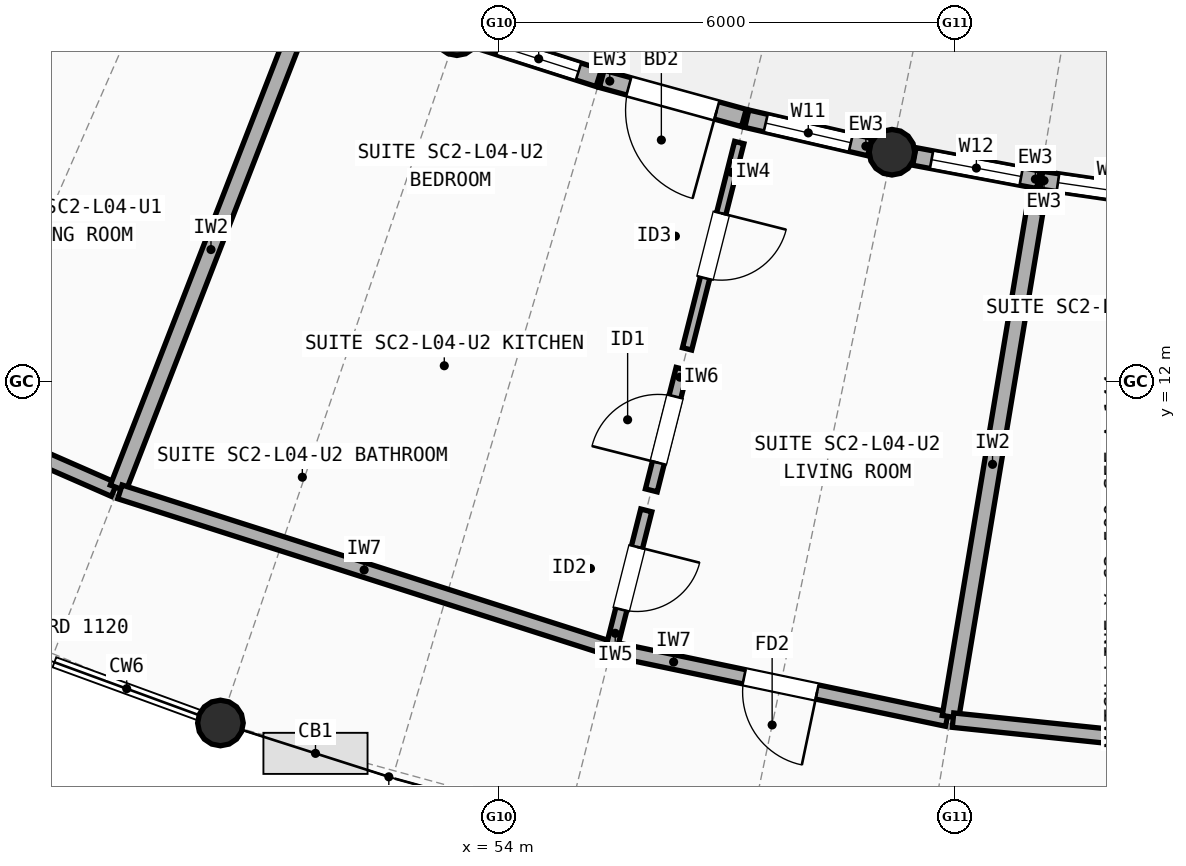
"""IFC4 building model, lengths in metres.
Left out: names, types, materials, properties, quantities, classifications, styles, units other than length and angle.
Written with IfcOpenShell. Run it as: python <this file> out.ifc"""

import sys

from ifc_helpers import new_model, si_unit, direction, frame, frame_2d, origin, origin_2d, place, context, subcontext, project, spatial, rectangle, circle, extrude, element, fill, save


model = new_model("IFC4")
c1 = context("Model", 3, precision=1e-05, world=origin(), true_north=direction((0.0, 1.0)))
c2 = subcontext(c1, "Body", "Model", "MODEL_VIEW")
j1 = project(units=[si_unit("LENGTHUNIT", "METRE"), si_unit("PLANEANGLEUNIT", "RADIAN")], contexts=[c1])
p1 = place(None, origin())
s1 = spatial("IfcSite", under=j1, at=p1, CompositionType="ELEMENT")
p2 = place(p1, origin())
s2 = spatial("IfcBuilding", under=s1, at=p2, CompositionType="ELEMENT")
p3 = place(p2, frame((0.0, 0.0, 14.1)))
s3 = spatial("IfcBuildingStorey", under=s2, at=p3, CompositionType="ELEMENT", Elevation=14.1)
for number, where, z_axis, x_axis in (
    (1, (53.445, 16.59, 0.0), (0.0, 0.0, 1.0), (1.0, 0.0, 0.0)),
    (2, (50.334, 7.508, 0.0), (0.0, 0.0, 1.0), (1.0, 0.0, 0.0)),
    (3, (59.169, 15.018, 0.0), (0.0, 0.0, 1.0), (1.0, 0.0, 0.0)),
):
    element("IfcColumn", number, at=place(p3, frame(where, z_axis=z_axis, x_axis=x_axis)), inside=s3, PredefinedType="COLUMN", context=c2, shape_type="SweptSolid", body=[
        extrude(circle(Radius=0.3, at=origin_2d()), origin(), (0.0, 0.0, 1.0), 2.948),
    ])
p4 = place(p3, frame((53.731, 16.499, 0.0), z_axis=(0.0, 0.0, 1.0), x_axis=(0.952523149859, -0.304466170508, 0.0)))
e4 = element("IfcWall", 4, at=p4, inside=s3, PredefinedType="STANDARD", context=c2, shape_type="SweptSolid", body=[
    extrude(rectangle(XDim=1.66, YDim=0.235, at=frame_2d((0.83, 0.0))), origin(), (0.0, 0.0, 1.0), 2.684),
])
p5 = place(p4, frame((0.28, 0.0, 0.85)))
e5 = element("IfcOpeningElement", 5, at=p5, cuts=e4, PredefinedType="OPENING", context=c2, shape_type="SweptSolid", body=[
    extrude(rectangle(XDim=1.1, YDim=1.45, at=frame_2d((0.55, 0.725))), frame((0.0, 0.127, 0.0), z_axis=(0.0, -1.0, 0.0), x_axis=(1.0, 0.0, 0.0)), (0.0, 0.0, 1.0), 0.255),
])
p6 = place(p3, frame((55.35, 15.982, 0.0), z_axis=(0.0, 0.0, 1.0), x_axis=(0.964271323293, -0.264916619098, 0.0)))
e6 = element("IfcWall", 6, at=p6, inside=s3, PredefinedType="STANDARD", context=c2, shape_type="SweptSolid", body=[
    extrude(rectangle(XDim=1.94, YDim=0.235, at=frame_2d((0.97, 0.0))), origin(), (0.0, 0.0, 1.0), 2.684),
])
p7 = place(p6, frame((0.37, 0.0, 0.0)))
e7 = element("IfcOpeningElement", 7, at=p7, cuts=e6, PredefinedType="OPENING", context=c2, shape_type="SweptSolid", body=[
    extrude(rectangle(XDim=1.2, YDim=2.15, at=frame_2d((0.6, 1.075))), frame((0.0, 0.127, 0.0), z_axis=(0.0, -1.0, 0.0), x_axis=(1.0, 0.0, 0.0)), (0.0, 0.0, 1.0), 0.255),
])
p8 = place(p3, frame((57.26, 15.458, 0.0), z_axis=(0.0, 0.0, 1.0), x_axis=(0.974354001174, -0.225020622158, 0.0)))
e8 = element("IfcWall", 8, at=p8, inside=s3, PredefinedType="STANDARD", context=c2, shape_type="SweptSolid", body=[
    extrude(rectangle(XDim=1.66, YDim=0.235, at=frame_2d((0.83, 0.0))), origin(), (0.0, 0.0, 1.0), 2.684),
])
p9 = place(p8, frame((0.255, 0.0, 0.85)))
e9 = element("IfcOpeningElement", 9, at=p9, cuts=e8, PredefinedType="OPENING", context=c2, shape_type="SweptSolid", body=[
    extrude(rectangle(XDim=1.15, YDim=1.45, at=frame_2d((0.575, 0.725))), frame((0.0, 0.127, 0.0), z_axis=(0.0, -1.0, 0.0), x_axis=(1.0, 0.0, 0.0)), (0.0, 0.0, 1.0), 0.255),
])
p10 = place(p3, frame((59.464, 14.962, 0.0), z_axis=(0.0, 0.0, 1.0), x_axis=(0.982820537681, -0.184563784945, 0.0)))
e10 = element("IfcWall", 10, at=p10, inside=s3, PredefinedType="STANDARD", context=c2, shape_type="SweptSolid", body=[
    extrude(rectangle(XDim=1.66, YDim=0.235, at=frame_2d((0.83, 0.0))), origin(), (0.0, 0.0, 1.0), 2.684),
])
p11 = place(p10, frame((0.23, 0.0, 0.85)))
e11 = element("IfcOpeningElement", 11, at=p11, cuts=e10, PredefinedType="OPENING", context=c2, shape_type="SweptSolid", body=[
    extrude(rectangle(XDim=1.2, YDim=1.35, at=frame_2d((0.6, 0.675))), frame((0.0, 0.127, 0.0), z_axis=(0.0, -1.0, 0.0), x_axis=(1.0, 0.0, 0.0)), (0.0, 0.0, 1.0), 0.255),
])
p12 = place(p3, frame((61.135, 14.649, 0.0), z_axis=(0.0, 0.0, 1.0), x_axis=(0.989601751146, -0.14383453733, 0.0)))
e12 = element("IfcWall", 12, at=p12, inside=s3, PredefinedType="STANDARD", context=c2, shape_type="SweptSolid", body=[
    extrude(rectangle(XDim=1.94, YDim=0.235, at=frame_2d((0.97, 0.0))), origin(), (0.0, 0.0, 1.0), 2.684),
])
p13 = place(p12, frame((0.22, 0.0, 0.85)))
e13 = element("IfcOpeningElement", 13, at=p13, cuts=e12, PredefinedType="OPENING", context=c2, shape_type="SweptSolid", body=[
    extrude(rectangle(XDim=1.5, YDim=1.4, at=frame_2d((0.75, 0.7))), frame((0.0, 0.127, 0.0), z_axis=(0.0, -1.0, 0.0), x_axis=(1.0, 0.0, 0.0)), (0.0, 0.0, 1.0), 0.255),
])
p14 = place(p3, frame((44.838, 12.371, 0.0), z_axis=(0.0, 0.0, 1.0), x_axis=(0.91610596958, -0.40093621999, 0.0)))
e14 = element("IfcWall", 14, at=p14, inside=s3, PredefinedType="SOLIDWALL", context=c2, shape_type="SweptSolid", body=[
    extrude(rectangle(XDim=4.473, YDim=0.19, at=frame_2d((2.237, 0.0))), origin(), (0.0, 0.0, 1.0), 2.742),
])
p15 = place(p14, frame((1.737, 0.0, 0.0)))
e15 = element("IfcOpeningElement", 15, at=p15, cuts=e14, PredefinedType="OPENING", context=c2, shape_type="SweptSolid", body=[
    extrude(rectangle(XDim=1.0, YDim=2.15, at=frame_2d((0.5, 1.075))), frame((0.0, 0.105, 0.0), z_axis=(0.0, -1.0, 0.0), x_axis=(1.0, 0.0, 0.0)), (0.0, 0.0, 1.0), 0.21),
])
p16 = place(p3, frame((51.431, 16.875, 0.0), z_axis=(0.0, 0.0, 1.0), x_axis=(-0.362801288891, -0.931866527341, 0.0)))
e16 = element("IfcWall", 16, at=p16, inside=s3, PredefinedType="SOLIDWALL", context=c2, shape_type="SweptSolid", body=[
    extrude(rectangle(XDim=6.736, YDim=0.22, at=frame_2d((3.368, 0.0))), origin(), (0.0, 0.0, 1.0), 2.762),
])
p17 = place(p3, frame((49.011, 10.549, 0.0), z_axis=(0.0, 0.0, 1.0), x_axis=(0.952529122406, -0.304447484746, 0.0)))
e17 = element("IfcWall", 17, at=p17, inside=s3, PredefinedType="SOLIDWALL", context=c2, shape_type="SweptSolid", body=[
    extrude(rectangle(XDim=6.747, YDim=0.19, at=frame_2d((3.374, 0.0))), origin(), (0.0, 0.0, 1.0), 2.722),
])
p18 = place(p3, frame((55.515, 8.474, 0.0), z_axis=(0.0, 0.0, 1.0), x_axis=(0.978806148413, -0.204788973894, 0.0)))
e18 = element("IfcWall", 18, at=p18, inside=s3, PredefinedType="SOLIDWALL", context=c2, shape_type="SweptSolid", body=[
    extrude(rectangle(XDim=4.473, YDim=0.19, at=frame_2d((2.236, 0.0))), origin(), (0.0, 0.0, 1.0), 2.722),
])
p19 = place(p18, frame((1.747, 0.0, 0.0)))
e19 = element("IfcOpeningElement", 19, at=p19, cuts=e18, PredefinedType="OPENING", context=c2, shape_type="SweptSolid", body=[
    extrude(rectangle(XDim=0.98, YDim=2.15, at=frame_2d((0.49, 1.075))), frame((0.0, 0.105, 0.0), z_axis=(0.0, -1.0, 0.0), x_axis=(1.0, 0.0, 0.0)), (0.0, 0.0, 1.0), 0.21),
])
p20 = place(p3, frame((57.16, 15.145, 0.0), z_axis=(0.0, 0.0, 1.0), x_axis=(-0.245017317517, -0.969518702304, 0.0)))
e20 = element("IfcWall", 20, at=p20, inside=s3, PredefinedType="PARTITIONING", context=c2, shape_type="SweptSolid", body=[
    extrude(rectangle(XDim=2.8, YDim=0.125, at=frame_2d((1.4, 0.0))), origin(), (0.0, 0.0, 1.0), 2.762),
])
p21 = place(p20, frame((0.96, 0.0, 0.0)))
e21 = element("IfcOpeningElement", 21, at=p21, cuts=e20, PredefinedType="OPENING", context=c2, shape_type="SweptSolid", body=[
    extrude(rectangle(XDim=0.88, YDim=2.1, at=frame_2d((0.44, 1.05))), frame((0.0, 0.073, 0.0), z_axis=(0.0, -1.0, 0.0), x_axis=(1.0, 0.0, 0.0)), (0.0, 0.0, 1.0), 0.145),
])
p22 = place(p3, frame((56.407, 12.167, 0.0), z_axis=(0.0, 0.0, 1.0), x_axis=(-0.245044695728, -0.969511782855, 0.0)))
e22 = element("IfcWall", 22, at=p22, inside=s3, PredefinedType="PLUMBINGWALL", context=c2, shape_type="SweptSolid", body=[
    extrude(rectangle(XDim=1.648, YDim=0.16, at=frame_2d((0.824, 0.0))), origin(), (0.0, 0.0, 1.0), 2.762),
])
p23 = place(p22, frame((0.374, 0.0, 0.0)))
e23 = element("IfcOpeningElement", 23, at=p23, cuts=e22, PredefinedType="OPENING", context=c2, shape_type="SweptSolid", body=[
    extrude(rectangle(XDim=0.9, YDim=2.1, at=frame_2d((0.45, 1.05))), frame((0.0, 0.09, 0.0), z_axis=(0.0, -1.0, 0.0), x_axis=(1.0, 0.0, 0.0)), (0.0, 0.0, 1.0), 0.18),
])
p24 = place(p3, frame((55.937, 10.305, 0.0), z_axis=(0.0, 0.0, 1.0), x_axis=(-0.24497035727, -0.969530568914, 0.0)))
e24 = element("IfcWall", 24, at=p24, inside=s3, PredefinedType="PARTITIONING", context=c2, shape_type="SweptSolid", body=[
    extrude(rectangle(XDim=1.84, YDim=0.15, at=frame_2d((0.92, 0.0))), origin(), (0.0, 0.0, 1.0), 2.762),
])
p25 = place(p24, frame((0.495, 0.0, 0.0)))
e25 = element("IfcOpeningElement", 25, at=p25, cuts=e24, PredefinedType="OPENING", context=c2, shape_type="SweptSolid", body=[
    extrude(rectangle(XDim=0.85, YDim=2.1, at=frame_2d((0.425, 1.05))), frame((0.0, 0.085, 0.0), z_axis=(0.0, -1.0, 0.0), x_axis=(1.0, 0.0, 0.0)), (0.0, 0.0, 1.0), 0.17),
])
p26 = place(p3, frame((61.046, 14.234, 0.0), z_axis=(0.0, 0.0, 1.0), x_axis=(-0.164263800505, -0.986416445445, 0.0)))
e26 = element("IfcWall", 26, at=p26, inside=s3, PredefinedType="SOLIDWALL", context=c2, shape_type="SweptSolid", body=[
    extrude(rectangle(XDim=6.736, YDim=0.22, at=frame_2d((3.368, 0.0))), origin(), (0.0, 0.0, 1.0), 2.742),
])
p27 = place(p3, frame((59.972, 7.546, 0.0), z_axis=(0.0, 0.0, 1.0), x_axis=(0.994686939686, -0.10294606364, 0.0)))
e27 = element("IfcWall", 27, at=p27, inside=s3, PredefinedType="SOLIDWALL", context=c2, shape_type="SweptSolid", body=[
    extrude(rectangle(XDim=6.747, YDim=0.19, at=frame_2d((3.374, 0.0))), origin(), (0.0, 0.0, 1.0), 2.722),
])
p28 = place(p5, origin())
e28 = element("IfcWindow", 28, at=p28, inside=s3, PartitioningType="SINGLE_PANEL", PredefinedType="WINDOW", context=c2, shape_type="SweptSolid", body=[
    extrude(rectangle(XDim=1.1, YDim=1.45, at=frame_2d((0.55, 0.725))), frame((0.0, 0.03, 0.0), z_axis=(0.0, -1.0, 0.0), x_axis=(1.0, 0.0, 0.0)), (0.0, 0.0, 1.0), 0.06),
])
fill(e5, e28)
p29 = place(p7, origin())
e29 = element("IfcDoor", 29, at=p29, inside=s3, OperationType="SINGLE_SWING_RIGHT", PredefinedType="DOOR", context=c2, shape_type="SweptSolid", body=[
    extrude(rectangle(XDim=1.2, YDim=2.15, at=frame_2d((0.6, 1.075))), frame((0.0, 0.025, 0.0), z_axis=(0.0, -1.0, 0.0), x_axis=(1.0, 0.0, 0.0)), (0.0, 0.0, 1.0), 0.05),
])
fill(e7, e29)
p30 = place(p9, origin())
e30 = element("IfcWindow", 30, at=p30, inside=s3, PartitioningType="SINGLE_PANEL", PredefinedType="WINDOW", context=c2, shape_type="SweptSolid", body=[
    extrude(rectangle(XDim=1.15, YDim=1.45, at=frame_2d((0.575, 0.725))), frame((0.0, 0.03, 0.0), z_axis=(0.0, -1.0, 0.0), x_axis=(1.0, 0.0, 0.0)), (0.0, 0.0, 1.0), 0.06),
])
fill(e9, e30)
p31 = place(p11, origin())
e31 = element("IfcWindow", 31, at=p31, inside=s3, PartitioningType="SINGLE_PANEL", PredefinedType="WINDOW", context=c2, shape_type="SweptSolid", body=[
    extrude(rectangle(XDim=1.2, YDim=1.35, at=frame_2d((0.6, 0.675))), frame((0.0, 0.03, 0.0), z_axis=(0.0, -1.0, 0.0), x_axis=(1.0, 0.0, 0.0)), (0.0, 0.0, 1.0), 0.06),
])
fill(e11, e31)
p32 = place(p13, origin())
e32 = element("IfcWindow", 32, at=p32, inside=s3, PartitioningType="SINGLE_PANEL", PredefinedType="WINDOW", context=c2, shape_type="SweptSolid", body=[
    extrude(rectangle(XDim=1.5, YDim=1.4, at=frame_2d((0.75, 0.7))), frame((0.0, 0.03, 0.0), z_axis=(0.0, -1.0, 0.0), x_axis=(1.0, 0.0, 0.0)), (0.0, 0.0, 1.0), 0.06),
])
fill(e13, e32)
p33 = place(p19, origin())
e33 = element("IfcDoor", 33, at=p33, inside=s3, OperationType="SINGLE_SWING_RIGHT", PredefinedType="DOOR", context=c2, shape_type="SweptSolid", body=[
    extrude(rectangle(XDim=0.98, YDim=2.15, at=frame_2d((0.49, 1.075))), frame((0.0, 0.025, 0.0), z_axis=(0.0, -1.0, 0.0), x_axis=(1.0, 0.0, 0.0)), (0.0, 0.0, 1.0), 0.05),
])
fill(e19, e33)
p34 = place(p21, origin())
e34 = element("IfcDoor", 34, at=p34, inside=s3, OperationType="SINGLE_SWING_LEFT", PredefinedType="DOOR", context=c2, shape_type="SweptSolid", body=[
    extrude(rectangle(XDim=0.88, YDim=2.1, at=frame_2d((0.44, 1.05))), frame((0.0, 0.025, 0.0), z_axis=(0.0, -1.0, 0.0), x_axis=(1.0, 0.0, 0.0)), (0.0, 0.0, 1.0), 0.05),
])
fill(e21, e34)
p35 = place(p23, origin())
e35 = element("IfcDoor", 35, at=p35, inside=s3, OperationType="SINGLE_SWING_RIGHT", PredefinedType="DOOR", context=c2, shape_type="SweptSolid", body=[
    extrude(rectangle(XDim=0.9, YDim=2.1, at=frame_2d((0.45, 1.05))), frame((0.0, 0.025, 0.0), z_axis=(0.0, -1.0, 0.0), x_axis=(1.0, 0.0, 0.0)), (0.0, 0.0, 1.0), 0.05),
])
fill(e23, e35)
p36 = place(p25, origin())
e36 = element("IfcDoor", 36, at=p36, inside=s3, OperationType="SINGLE_SWING_LEFT", PredefinedType="DOOR", context=c2, shape_type="SweptSolid", body=[
    extrude(rectangle(XDim=0.85, YDim=2.1, at=frame_2d((0.425, 1.05))), frame((0.0, 0.025, 0.0), z_axis=(0.0, -1.0, 0.0), x_axis=(1.0, 0.0, 0.0)), (0.0, 0.0, 1.0), 0.05),
])
fill(e25, e36)
save(model, sys.argv[1])
